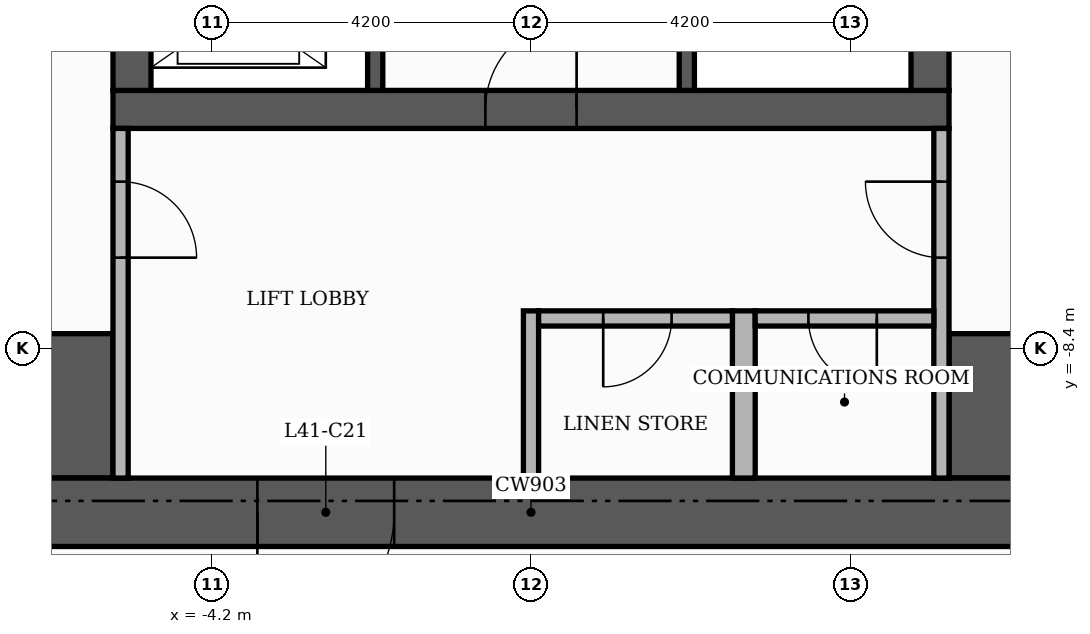
"""IFC4 building model, lengths in metres.
Left out: names, types, materials, properties, quantities, classifications, styles, units other than length and angle.
Written with IfcOpenShell. Run it as: python <this file> out.ifc"""

import sys

from ifc_helpers import new_model, si_unit, direction, frame, frame_2d, origin, place, context, subcontext, project, spatial, rectangle, extrude, element, fill, save


model = new_model("IFC4")
c1 = context("Model", 3, precision=1e-05, world=origin(), true_north=direction((0.0, 1.0)))
c2 = subcontext(c1, "Body", "Model", "MODEL_VIEW")
j1 = project(units=[si_unit("LENGTHUNIT", "METRE"), si_unit("PLANEANGLEUNIT", "RADIAN")], contexts=[c1])
p1 = place(None, origin())
s1 = spatial("IfcSite", under=j1, at=p1, CompositionType="ELEMENT")
p2 = place(p1, origin())
s2 = spatial("IfcBuilding", under=s1, at=p2, CompositionType="ELEMENT")
p3 = place(p2, frame((0.0, 0.0, 172.8)))
s3 = spatial("IfcBuildingStorey", under=s2, at=p3, CompositionType="ELEMENT", Elevation=172.8)
p4 = place(p3, frame((-5.5, -5.25, 0.0), z_axis=(0.0, 0.0, 1.0), x_axis=(1.0, 0.0, 0.0)))
e1 = element("IfcWall", 1, at=p4, inside=s3, PredefinedType="SHEAR", context=c2, shape_type="SweptSolid", body=[
    extrude(rectangle(XDim=11.0, YDim=0.5, at=frame_2d((5.5, 0.0))), origin(), (0.0, 0.0, 1.0), 3.48),
])
p5 = place(p4, frame((4.9, 0.0, 0.0)))
e2 = element("IfcOpeningElement", 2, at=p5, cuts=e1, PredefinedType="OPENING", context=c2, shape_type="SweptSolid", body=[
    extrude(rectangle(XDim=1.2, YDim=2.1, at=frame_2d((0.6, 1.05))), frame((0.0, 0.26, 0.0), z_axis=(0.0, -1.0, 0.0), x_axis=(1.0, 0.0, 0.0)), (0.0, 0.0, 1.0), 0.52),
])
for number, where, z_axis, x_axis in (
    (3, (-5.25, -5.0, 0.0), (0.0, 0.0, 1.0), (0.0, 1.0, 0.0)),
    (4, (5.25, -5.0, 0.0), (0.0, 0.0, 1.0), (0.0, 1.0, 0.0)),
):
    element("IfcWall", number, at=place(p3, frame(where, z_axis=z_axis, x_axis=x_axis)), inside=s3, PredefinedType="SHEAR", context=c2, shape_type="SweptSolid", body=[
        extrude(rectangle(XDim=10.5, YDim=0.5, at=frame_2d((5.25, 0.0))), origin(), (0.0, 0.0, 1.0), 3.48),
    ])
for number, where, z_axis, x_axis in (
    (5, (-10.1, -9.15, 0.0), (0.0, 0.0, 1.0), (1.0, 0.0, 0.0)),
    (6, (5.5, -9.15, 0.0), (0.0, 0.0, 1.0), (1.0, 0.0, 0.0)),
):
    element("IfcWall", number, at=place(p3, frame(where, z_axis=z_axis, x_axis=x_axis)), inside=s3, PredefinedType="SHEAR", context=c2, shape_type="SweptSolid", body=[
        extrude(rectangle(XDim=4.6, YDim=1.9, at=frame_2d((2.3, 0.0))), origin(), (0.0, 0.0, 1.0), 3.48),
    ])
p6 = place(p3, frame((2.05, -5.0, 0.0), z_axis=(0.0, 0.0, 1.0), x_axis=(0.0, 1.0, 0.0)))
e7 = element("IfcWall", 7, at=p6, inside=s3, PredefinedType="SHEAR", context=c2, shape_type="SweptSolid", body=[
    extrude(rectangle(XDim=6.6, YDim=0.2, at=frame_2d((3.3, 0.0))), origin(), (0.0, 0.0, 1.0), 3.48),
])
p7 = place(p6, frame((5.25, 0.0, 0.0)))
e8 = element("IfcOpeningElement", 8, at=p7, cuts=e7, PredefinedType="OPENING", context=c2, shape_type="SweptSolid", body=[
    extrude(rectangle(XDim=1.0, YDim=2.1, at=frame_2d((0.5, 1.05))), frame((0.0, 0.11, 0.0), z_axis=(0.0, -1.0, 0.0), x_axis=(1.0, 0.0, 0.0)), (0.0, 0.0, 1.0), 0.22),
])
p8 = place(p3, frame((-2.05, -5.0, 0.0), z_axis=(0.0, 0.0, 1.0), x_axis=(0.0, 1.0, 0.0)))
e9 = element("IfcWall", 9, at=p8, inside=s3, PredefinedType="SHEAR", context=c2, shape_type="SweptSolid", body=[
    extrude(rectangle(XDim=3.4, YDim=0.2, at=frame_2d((1.7, 0.0))), origin(), (0.0, 0.0, 1.0), 3.48),
])
p9 = place(p8, frame((0.55, 0.0, 0.0)))
e10 = element("IfcOpeningElement", 10, at=p9, cuts=e9, PredefinedType="OPENING", context=c2, shape_type="SweptSolid", body=[
    extrude(rectangle(XDim=1.1, YDim=2.1, at=frame_2d((0.55, 1.05))), frame((0.0, 0.11, 0.0), z_axis=(0.0, -1.0, 0.0), x_axis=(1.0, 0.0, 0.0)), (0.0, 0.0, 1.0), 0.22),
])
p10 = place(p8, frame((2.45, 0.0, 0.0)))
e11 = element("IfcOpeningElement", 11, at=p10, cuts=e9, PredefinedType="OPENING", context=c2, shape_type="SweptSolid", body=[
    extrude(rectangle(XDim=0.8, YDim=2.1, at=frame_2d((0.4, 1.05))), frame((0.0, 0.11, 0.0), z_axis=(0.0, -1.0, 0.0), x_axis=(1.0, 0.0, 0.0)), (0.0, 0.0, 1.0), 0.22),
])
p11 = place(p3, frame((-11.0, -10.55, 0.0), z_axis=(0.0, 0.0, 1.0), x_axis=(1.0, 0.0, 0.0)))
e12 = element("IfcWall", 12, at=p11, inside=s3, PredefinedType="SHEAR", context=c2, shape_type="SweptSolid", body=[
    extrude(rectangle(XDim=22.0, YDim=0.9, at=frame_2d((11.0, 0.0))), origin(), (0.0, 0.0, 1.0), 3.48),
])
p12 = place(p11, frame((7.4, 0.0, 0.0)))
e13 = element("IfcOpeningElement", 13, at=p12, cuts=e12, PredefinedType="OPENING", context=c2, shape_type="SweptSolid", body=[
    extrude(rectangle(XDim=1.8, YDim=2.2, at=frame_2d((0.9, 1.1))), frame((0.0, 0.46, 0.0), z_axis=(0.0, -1.0, 0.0), x_axis=(1.0, 0.0, 0.0)), (0.0, 0.0, 1.0), 0.92),
])
p13 = place(p3, frame((-5.4, -10.1, 0.0), z_axis=(0.0, 0.0, 1.0), x_axis=(0.0, 1.0, 0.0)))
e14 = element("IfcWall", 14, at=p13, inside=s3, PredefinedType="PARTITIONING", context=c2, shape_type="SweptSolid", body=[
    extrude(rectangle(XDim=4.6, YDim=0.2, at=frame_2d((2.3, 0.0))), origin(), (0.0, 0.0, 1.0), 3.48),
])
p14 = place(p13, frame((2.9, 0.0, 0.0)))
e15 = element("IfcOpeningElement", 15, at=p14, cuts=e14, PredefinedType="OPENING", context=c2, shape_type="SweptSolid", body=[
    extrude(rectangle(XDim=1.0, YDim=2.1, at=frame_2d((0.5, 1.05))), frame((0.0, 0.11, 0.0), z_axis=(0.0, -1.0, 0.0), x_axis=(1.0, 0.0, 0.0)), (0.0, 0.0, 1.0), 0.22),
])
p15 = place(p3, frame((0.0, -10.1, 0.0), z_axis=(0.0, 0.0, 1.0), x_axis=(0.0, 1.0, 0.0)))
e16 = element("IfcWall", 16, at=p15, inside=s3, PredefinedType="PARTITIONING", context=c2, shape_type="SweptSolid", body=[
    extrude(rectangle(XDim=2.2, YDim=0.2, at=frame_2d((1.1, 0.0))), origin(), (0.0, 0.0, 1.0), 3.48),
])
p16 = place(p3, frame((2.8, -10.1, 0.0), z_axis=(0.0, 0.0, 1.0), x_axis=(0.0, 1.0, 0.0)))
e17 = element("IfcWall", 17, at=p16, inside=s3, PredefinedType="PARTITIONING", context=c2, shape_type="SweptSolid", body=[
    extrude(rectangle(XDim=2.2, YDim=0.3, at=frame_2d((1.1, 0.0))), origin(), (0.0, 0.0, 1.0), 3.48),
])
p17 = place(p3, frame((5.4, -10.1, 0.0), z_axis=(0.0, 0.0, 1.0), x_axis=(0.0, 1.0, 0.0)))
e18 = element("IfcWall", 18, at=p17, inside=s3, PredefinedType="PARTITIONING", context=c2, shape_type="SweptSolid", body=[
    extrude(rectangle(XDim=4.6, YDim=0.2, at=frame_2d((2.3, 0.0))), origin(), (0.0, 0.0, 1.0), 3.48),
])
p18 = place(p17, frame((2.9, 0.0, 0.0)))
e19 = element("IfcOpeningElement", 19, at=p18, cuts=e18, PredefinedType="OPENING", context=c2, shape_type="SweptSolid", body=[
    extrude(rectangle(XDim=1.0, YDim=2.1, at=frame_2d((0.5, 1.05))), frame((0.0, 0.11, 0.0), z_axis=(0.0, -1.0, 0.0), x_axis=(1.0, 0.0, 0.0)), (0.0, 0.0, 1.0), 0.22),
])
p19 = place(p3, frame((0.1, -8.0, 0.0), z_axis=(0.0, 0.0, 1.0), x_axis=(1.0, 0.0, 0.0)))
e20 = element("IfcWall", 20, at=p19, inside=s3, PredefinedType="PARTITIONING", context=c2, shape_type="SweptSolid", body=[
    extrude(rectangle(XDim=2.55, YDim=0.2, at=frame_2d((1.275, 0.0))), origin(), (0.0, 0.0, 1.0), 3.48),
])
p20 = place(p19, frame((0.85, 0.0, 0.0)))
e21 = element("IfcOpeningElement", 21, at=p20, cuts=e20, PredefinedType="OPENING", context=c2, shape_type="SweptSolid", body=[
    extrude(rectangle(XDim=0.9, YDim=2.1, at=frame_2d((0.45, 1.05))), frame((0.0, 0.11, 0.0), z_axis=(0.0, -1.0, 0.0), x_axis=(1.0, 0.0, 0.0)), (0.0, 0.0, 1.0), 0.22),
])
p21 = place(p3, frame((2.95, -8.0, 0.0), z_axis=(0.0, 0.0, 1.0), x_axis=(1.0, 0.0, 0.0)))
e22 = element("IfcWall", 22, at=p21, inside=s3, PredefinedType="PARTITIONING", context=c2, shape_type="SweptSolid", body=[
    extrude(rectangle(XDim=2.35, YDim=0.2, at=frame_2d((1.175, 0.0))), origin(), (0.0, 0.0, 1.0), 3.48),
])
p22 = place(p21, frame((0.7, 0.0, 0.0)))
e23 = element("IfcOpeningElement", 23, at=p22, cuts=e22, PredefinedType="OPENING", context=c2, shape_type="SweptSolid", body=[
    extrude(rectangle(XDim=0.9, YDim=2.1, at=frame_2d((0.45, 1.05))), frame((0.0, 0.11, 0.0), z_axis=(0.0, -1.0, 0.0), x_axis=(1.0, 0.0, 0.0)), (0.0, 0.0, 1.0), 0.22),
])
p23 = place(p5, origin())
e24 = element("IfcDoor", 24, at=p23, inside=s3, OperationType="SINGLE_SWING_RIGHT", PredefinedType="DOOR", context=c2, shape_type="SweptSolid", body=[
    extrude(rectangle(XDim=1.2, YDim=2.1, at=frame_2d((0.6, 1.05))), frame((0.0, 0.025, 0.0), z_axis=(0.0, -1.0, 0.0), x_axis=(1.0, 0.0, 0.0)), (0.0, 0.0, 1.0), 0.05),
])
fill(e2, e24)
p24 = place(p14, frame((1.0, 0.0, 0.0), z_axis=(0.0, 0.0, 1.0), x_axis=(-1.0, 0.0, 0.0)))
e25 = element("IfcDoor", 25, at=p24, inside=s3, OperationType="SINGLE_SWING_LEFT", PredefinedType="DOOR", context=c2, shape_type="SweptSolid", body=[
    extrude(rectangle(XDim=1.0, YDim=2.1, at=frame_2d((0.5, 1.05))), frame((0.0, 0.025, 0.0), z_axis=(0.0, -1.0, 0.0), x_axis=(1.0, 0.0, 0.0)), (0.0, 0.0, 1.0), 0.05),
])
fill(e15, e25)
p25 = place(p18, origin())
e26 = element("IfcDoor", 26, at=p25, inside=s3, OperationType="SINGLE_SWING_RIGHT", PredefinedType="DOOR", context=c2, shape_type="SweptSolid", body=[
    extrude(rectangle(XDim=1.0, YDim=2.1, at=frame_2d((0.5, 1.05))), frame((0.0, 0.025, 0.0), z_axis=(0.0, -1.0, 0.0), x_axis=(1.0, 0.0, 0.0)), (0.0, 0.0, 1.0), 0.05),
])
fill(e19, e26)
p26 = place(p12, frame((1.8, 0.0, 0.0), z_axis=(0.0, 0.0, 1.0), x_axis=(-1.0, 0.0, 0.0)))
e27 = element("IfcDoor", 27, at=p26, inside=s3, OperationType="DOUBLE_DOOR_SINGLE_SWING", PredefinedType="DOOR", context=c2, shape_type="SweptSolid", body=[
    extrude(rectangle(XDim=1.8, YDim=2.2, at=frame_2d((0.9, 1.1))), frame((0.0, 0.025, 0.0), z_axis=(0.0, -1.0, 0.0), x_axis=(1.0, 0.0, 0.0)), (0.0, 0.0, 1.0), 0.05),
])
fill(e13, e27)
p27 = place(p20, frame((0.9, 0.0, 0.0), z_axis=(0.0, 0.0, 1.0), x_axis=(-1.0, 0.0, 0.0)))
e28 = element("IfcDoor", 28, at=p27, inside=s3, OperationType="SINGLE_SWING_LEFT", PredefinedType="DOOR", context=c2, shape_type="SweptSolid", body=[
    extrude(rectangle(XDim=0.9, YDim=2.1, at=frame_2d((0.45, 1.05))), frame((0.0, 0.025, 0.0), z_axis=(0.0, -1.0, 0.0), x_axis=(1.0, 0.0, 0.0)), (0.0, 0.0, 1.0), 0.05),
])
fill(e21, e28)
p28 = place(p22, frame((0.9, 0.0, 0.0), z_axis=(0.0, 0.0, 1.0), x_axis=(-1.0, 0.0, 0.0)))
e29 = element("IfcDoor", 29, at=p28, inside=s3, OperationType="SINGLE_SWING_RIGHT", PredefinedType="DOOR", context=c2, shape_type="SweptSolid", body=[
    extrude(rectangle(XDim=0.9, YDim=2.1, at=frame_2d((0.45, 1.05))), frame((0.0, 0.025, 0.0), z_axis=(0.0, -1.0, 0.0), x_axis=(1.0, 0.0, 0.0)), (0.0, 0.0, 1.0), 0.05),
])
fill(e23, e29)
save(model, sys.argv[1])
